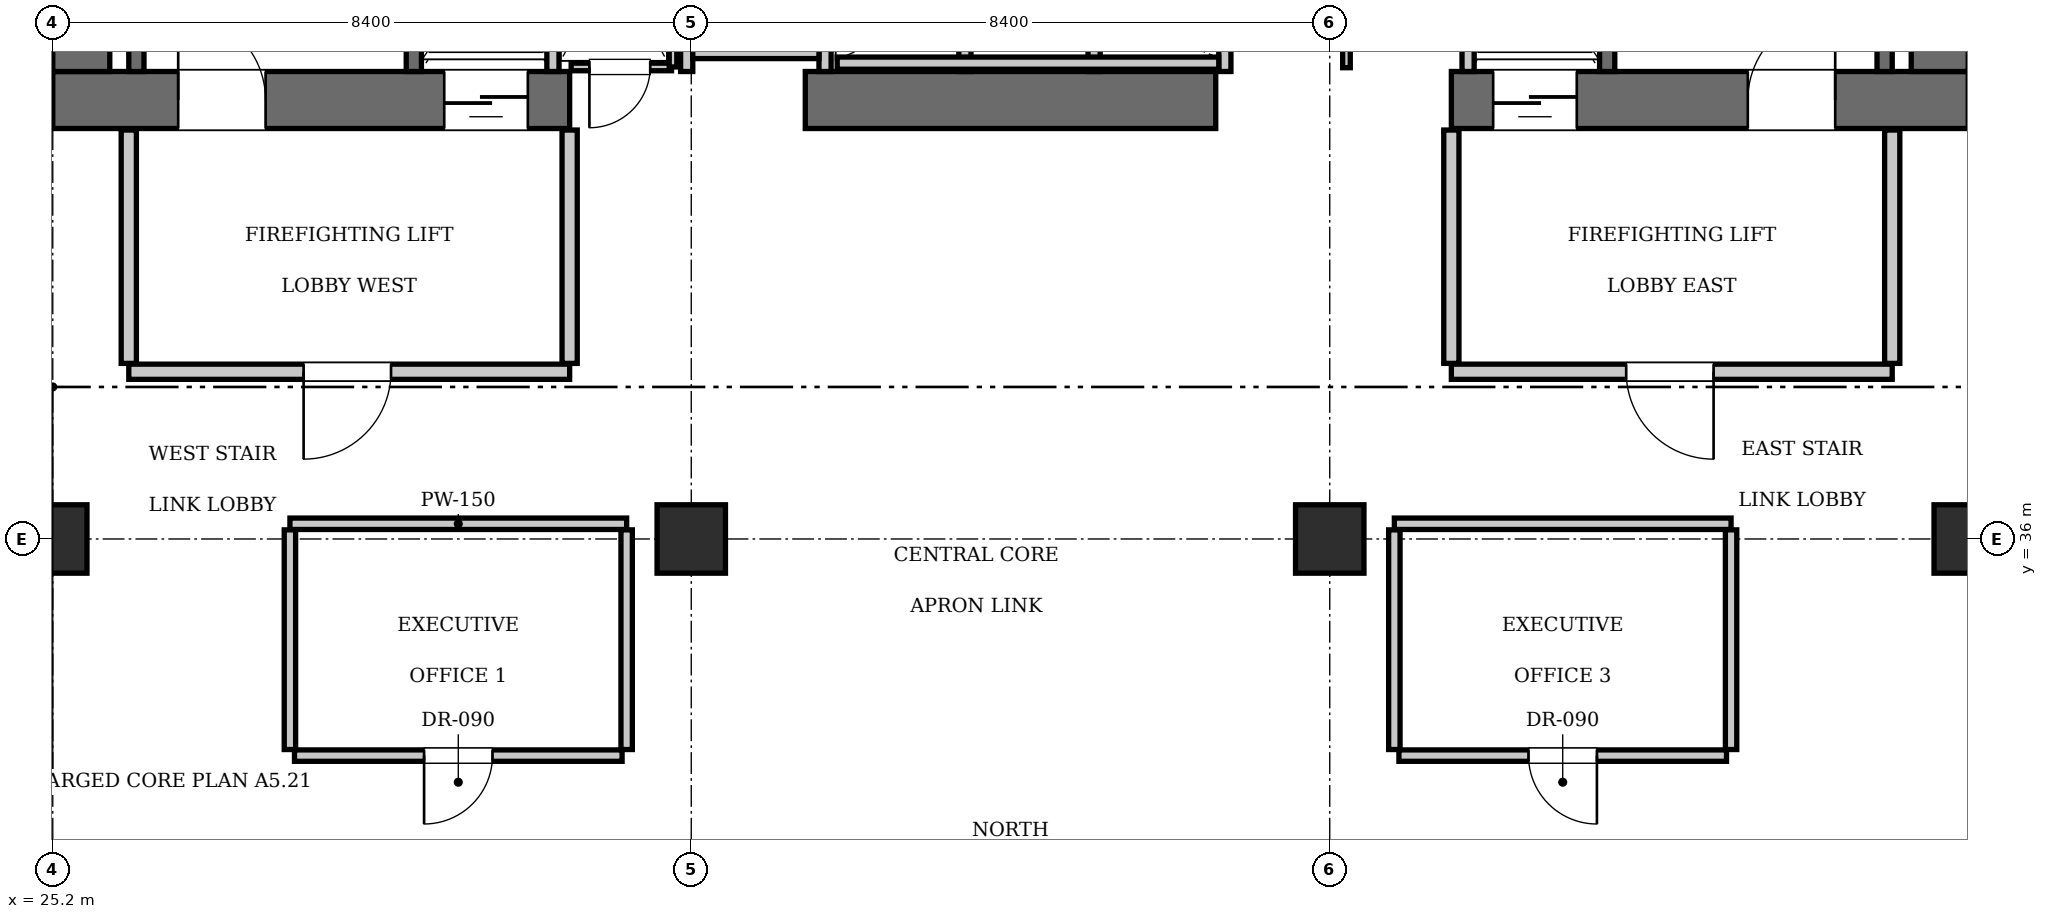
"""IFC4 building model, lengths in metres.
Left out: names, types, materials, properties, quantities, classifications, styles, units other than length and angle.
Written with IfcOpenShell. Run it as: python <this file> out.ifc"""

import sys

from ifc_helpers import new_model, si_unit, direction, frame, frame_2d, origin, origin_2d, place, context, subcontext, project, spatial, rectangle, extrude, element, fill, save


model = new_model("IFC4")
c1 = context("Model", 3, precision=1e-05, world=origin(), true_north=direction((0.0, 1.0)))
c2 = subcontext(c1, "Body", "Model", "MODEL_VIEW")
j1 = project(units=[si_unit("LENGTHUNIT", "METRE"), si_unit("PLANEANGLEUNIT", "RADIAN")], contexts=[c1])
p1 = place(None, origin())
s1 = spatial("IfcSite", under=j1, at=p1, CompositionType="ELEMENT")
p2 = place(p1, origin())
s2 = spatial("IfcBuilding", under=s1, at=p2, CompositionType="ELEMENT")
p3 = place(p2, frame((0.0, 0.0, 200.55)))
s3 = spatial("IfcBuildingStorey", under=s2, at=p3, CompositionType="ELEMENT", Elevation=200.55)
p4 = place(p3, frame((25.2, 41.775, 0.0), z_axis=(0.0, 0.0, 1.0), x_axis=(1.0, 0.0, 0.0)))
e1 = element("IfcWall", 1, at=p4, inside=s3, PredefinedType="SHEAR", context=c2, shape_type="SweptSolid", body=[
    extrude(rectangle(XDim=6.8, YDim=0.75, at=frame_2d((3.4, 0.0))), origin(), (0.0, 0.0, 1.0), 3.85),
])
p5 = place(p4, frame((1.65, 0.0, 0.0)))
e2 = element("IfcOpeningElement", 2, at=p5, cuts=e1, PredefinedType="OPENING", context=c2, shape_type="SweptSolid", body=[
    extrude(rectangle(XDim=1.15, YDim=2.15, at=frame_2d((0.575, 1.075))), frame((0.0, 0.385, 0.0), z_axis=(0.0, -1.0, 0.0), x_axis=(1.0, 0.0, 0.0)), (0.0, 0.0, 1.0), 0.77),
])
p6 = place(p4, frame((5.15, 0.0, 0.0)))
e3 = element("IfcOpeningElement", 3, at=p6, cuts=e1, PredefinedType="OPENING", context=c2, shape_type="SweptSolid", body=[
    extrude(rectangle(XDim=1.1, YDim=2.2, at=frame_2d((0.55, 1.1))), frame((0.0, 0.385, 0.0), z_axis=(0.0, -1.0, 0.0), x_axis=(1.0, 0.0, 0.0)), (0.0, 0.0, 1.0), 0.77),
])
p7 = place(p3, frame((35.1, 41.775, 0.0), z_axis=(0.0, 0.0, 1.0), x_axis=(1.0, 0.0, 0.0)))
e4 = element("IfcWall", 4, at=p7, inside=s3, PredefinedType="SHEAR", context=c2, shape_type="SweptSolid", body=[
    extrude(rectangle(XDim=5.4, YDim=0.75, at=frame_2d((2.7, 0.0))), origin(), (0.0, 0.0, 1.0), 3.85),
])
p8 = place(p3, frame((43.6, 41.775, 0.0), z_axis=(0.0, 0.0, 1.0), x_axis=(1.0, 0.0, 0.0)))
e5 = element("IfcWall", 5, at=p8, inside=s3, PredefinedType="SHEAR", context=c2, shape_type="SweptSolid", body=[
    extrude(rectangle(XDim=6.8, YDim=0.75, at=frame_2d((3.4, 0.0))), origin(), (0.0, 0.0, 1.0), 3.85),
])
p9 = place(p8, frame((3.9, 0.0, 0.0)))
e6 = element("IfcOpeningElement", 6, at=p9, cuts=e5, PredefinedType="OPENING", context=c2, shape_type="SweptSolid", body=[
    extrude(rectangle(XDim=1.15, YDim=2.15, at=frame_2d((0.575, 1.075))), frame((0.0, 0.385, 0.0), z_axis=(0.0, -1.0, 0.0), x_axis=(1.0, 0.0, 0.0)), (0.0, 0.0, 1.0), 0.77),
])
p10 = place(p8, frame((0.55, 0.0, 0.0)))
e7 = element("IfcOpeningElement", 7, at=p10, cuts=e5, PredefinedType="OPENING", context=c2, shape_type="SweptSolid", body=[
    extrude(rectangle(XDim=1.1, YDim=2.2, at=frame_2d((0.55, 1.1))), frame((0.0, 0.385, 0.0), z_axis=(0.0, -1.0, 0.0), x_axis=(1.0, 0.0, 0.0)), (0.0, 0.0, 1.0), 0.77),
])
for number, where, z_axis, x_axis in (
    (8, (25.575, 42.15, 0.0), (0.0, 0.0, 1.0), (0.0, 1.0, 0.0)),
    (9, (50.025, 42.15, 0.0), (0.0, 0.0, 1.0), (0.0, 1.0, 0.0)),
):
    element("IfcWall", number, at=place(p3, frame(where, z_axis=z_axis, x_axis=x_axis)), inside=s3, PredefinedType="SHEAR", context=c2, shape_type="SweptSolid", body=[
        extrude(rectangle(XDim=1.9, YDim=0.75, at=frame_2d((0.95, 0.0))), origin(), (0.0, 0.0, 1.0), 3.85),
    ])
for number, where, z_axis, x_axis in (
    (10, (25.2, 36.0, 0.0), (0.0, 0.0, 1.0), (1.0, 0.0, 0.0)),
    (11, (33.6, 36.0, 0.0), (0.0, 0.0, 1.0), (1.0, 0.0, 0.0)),
    (12, (42.0, 36.0, 0.0), (0.0, 0.0, 1.0), (1.0, 0.0, 0.0)),
    (13, (50.4, 36.0, 0.0), (0.0, 0.0, 1.0), (1.0, 0.0, 0.0)),
):
    element("IfcColumn", number, at=place(p3, frame(where, z_axis=z_axis, x_axis=x_axis)), inside=s3, PredefinedType="COLUMN", context=c2, shape_type="SweptSolid", body=[
        extrude(rectangle(XDim=0.9, YDim=0.9, at=origin_2d()), origin(), (0.0, 0.0, 1.0), 3.85),
    ])
p11 = place(p3, frame((29.95, 42.15, 0.0), z_axis=(0.0, 0.0, 1.0), x_axis=(0.0, 1.0, 0.0)))
e14 = element("IfcWall", 14, at=p11, inside=s3, PredefinedType="SOLIDWALL", context=c2, shape_type="SweptSolid", body=[
    extrude(rectangle(XDim=9.0, YDim=0.2, at=frame_2d((4.5, 0.0))), origin(), (0.0, 0.0, 1.0), 3.61),
])
p12 = place(p3, frame((26.3, 42.15, 0.0), z_axis=(0.0, 0.0, 1.0), x_axis=(0.0, 1.0, 0.0)))
e15 = element("IfcWall", 15, at=p12, inside=s3, PredefinedType="SOLIDWALL", context=c2, shape_type="SweptSolid", body=[
    extrude(rectangle(XDim=1.87, YDim=0.2, at=frame_2d((0.935, 0.0))), origin(), (0.0, 0.0, 1.0), 3.61),
])
p13 = place(p3, frame((45.65, 42.15, 0.0), z_axis=(0.0, 0.0, 1.0), x_axis=(0.0, 1.0, 0.0)))
e16 = element("IfcWall", 16, at=p13, inside=s3, PredefinedType="SOLIDWALL", context=c2, shape_type="SweptSolid", body=[
    extrude(rectangle(XDim=9.0, YDim=0.2, at=frame_2d((4.5, 0.0))), origin(), (0.0, 0.0, 1.0), 3.61),
])
p14 = place(p3, frame((49.3, 42.15, 0.0), z_axis=(0.0, 0.0, 1.0), x_axis=(0.0, 1.0, 0.0)))
e17 = element("IfcWall", 17, at=p14, inside=s3, PredefinedType="SOLIDWALL", context=c2, shape_type="SweptSolid", body=[
    extrude(rectangle(XDim=1.87, YDim=0.2, at=frame_2d((0.935, 0.0))), origin(), (0.0, 0.0, 1.0), 3.61),
])
for number, where, z_axis, x_axis in (
    (18, (31.78, 42.15, 0.0), (0.0, 0.0, 1.0), (0.0, 1.0, 0.0)),
    (19, (43.82, 42.15, 0.0), (0.0, 0.0, 1.0), (0.0, 1.0, 0.0)),
):
    element("IfcWall", number, at=place(p3, frame(where, z_axis=z_axis, x_axis=x_axis)), inside=s3, PredefinedType="SOLIDWALL", context=c2, shape_type="SweptSolid", body=[
        extrude(rectangle(XDim=2.59, YDim=0.16, at=frame_2d((1.295, 0.0))), origin(), (0.0, 0.0, 1.0), 3.61),
    ])
for number, where, z_axis, x_axis in (
    (20, (37.2, 42.15, 0.0), (0.0, 0.0, 1.0), (0.0, 1.0, 0.0)),
    (21, (38.9, 42.15, 0.0), (0.0, 0.0, 1.0), (0.0, 1.0, 0.0)),
    (22, (40.62, 42.15, 0.0), (0.0, 0.0, 1.0), (0.0, 1.0, 0.0)),
):
    element("IfcWall", number, at=place(p3, frame(where, z_axis=z_axis, x_axis=x_axis)), inside=s3, PredefinedType="SOLIDWALL", context=c2, shape_type="SweptSolid", body=[
        extrude(rectangle(XDim=2.2, YDim=0.16, at=frame_2d((1.1, 0.0))), origin(), (0.0, 0.0, 1.0), 3.61),
    ])
p15 = place(p3, frame((35.52, 42.26, 0.0), z_axis=(0.0, 0.0, 1.0), x_axis=(1.0, 0.0, 0.0)))
e23 = element("IfcWall", 23, at=p15, inside=s3, PredefinedType="SOLIDWALL", context=c2, shape_type="SweptSolid", body=[
    extrude(rectangle(XDim=5.02, YDim=0.16, at=frame_2d((2.51, 0.0))), origin(), (0.0, 0.0, 1.0), 3.61),
])
for number, where, z_axis, x_axis in (
    (24, (33.54, 42.15, 0.0), (0.0, 0.0, 1.0), (0.0, 1.0, 0.0)),
    (25, (35.36, 42.15, 0.0), (0.0, 0.0, 1.0), (0.0, 1.0, 0.0)),
):
    element("IfcWall", number, at=place(p3, frame(where, z_axis=z_axis, x_axis=x_axis)), inside=s3, PredefinedType="SOLIDWALL", context=c2, shape_type="SweptSolid", body=[
        extrude(rectangle(XDim=2.25, YDim=0.16, at=frame_2d((1.125, 0.0))), origin(), (0.0, 0.0, 1.0), 3.61),
    ])
p16 = place(p3, frame((33.62, 42.4, 0.0), z_axis=(0.0, 0.0, 1.0), x_axis=(1.0, 0.0, 0.0)))
e26 = element("IfcWall", 26, at=p16, inside=s3, PredefinedType="SOLIDWALL", context=c2, shape_type="SweptSolid", body=[
    extrude(rectangle(XDim=1.66, YDim=0.16, at=frame_2d((0.83, 0.0))), origin(), (0.0, 0.0, 1.0), 3.61),
])
p17 = place(p3, frame((26.2, 38.2, 0.0), z_axis=(0.0, 0.0, 1.0), x_axis=(1.0, 0.0, 0.0)))
e27 = element("IfcWall", 27, at=p17, inside=s3, PredefinedType="PARTITIONING", context=c2, shape_type="SweptSolid", body=[
    extrude(rectangle(XDim=5.8, YDim=0.2, at=frame_2d((2.9, 0.0))), origin(), (0.0, 0.0, 1.0), 3.61),
])
p18 = place(p17, frame((2.3, 0.0, 0.0)))
e28 = element("IfcOpeningElement", 28, at=p18, cuts=e27, PredefinedType="OPENING", context=c2, shape_type="SweptSolid", body=[
    extrude(rectangle(XDim=1.15, YDim=2.15, at=frame_2d((0.575, 1.075))), frame((0.0, 0.11, 0.0), z_axis=(0.0, -1.0, 0.0), x_axis=(1.0, 0.0, 0.0)), (0.0, 0.0, 1.0), 0.22),
])
for number, where, z_axis, x_axis in (
    (29, (26.2, 38.31, 0.0), (0.0, 0.0, 1.0), (0.0, 1.0, 0.0)),
    (30, (32.0, 38.31, 0.0), (0.0, 0.0, 1.0), (0.0, 1.0, 0.0)),
):
    element("IfcWall", number, at=place(p3, frame(where, z_axis=z_axis, x_axis=x_axis)), inside=s3, PredefinedType="PARTITIONING", context=c2, shape_type="SweptSolid", body=[
        extrude(rectangle(XDim=3.07, YDim=0.2, at=frame_2d((1.535, 0.0))), origin(), (0.0, 0.0, 1.0), 3.61),
    ])
p19 = place(p3, frame((43.6, 38.2, 0.0), z_axis=(0.0, 0.0, 1.0), x_axis=(1.0, 0.0, 0.0)))
e31 = element("IfcWall", 31, at=p19, inside=s3, PredefinedType="PARTITIONING", context=c2, shape_type="SweptSolid", body=[
    extrude(rectangle(XDim=5.8, YDim=0.2, at=frame_2d((2.9, 0.0))), origin(), (0.0, 0.0, 1.0), 3.61),
])
p20 = place(p19, frame((2.3, 0.0, 0.0)))
e32 = element("IfcOpeningElement", 32, at=p20, cuts=e31, PredefinedType="OPENING", context=c2, shape_type="SweptSolid", body=[
    extrude(rectangle(XDim=1.15, YDim=2.15, at=frame_2d((0.575, 1.075))), frame((0.0, 0.11, 0.0), z_axis=(0.0, -1.0, 0.0), x_axis=(1.0, 0.0, 0.0)), (0.0, 0.0, 1.0), 0.22),
])
for number, where, z_axis, x_axis in (
    (33, (43.6, 38.31, 0.0), (0.0, 0.0, 1.0), (0.0, 1.0, 0.0)),
    (34, (49.4, 38.31, 0.0), (0.0, 0.0, 1.0), (0.0, 1.0, 0.0)),
):
    element("IfcWall", number, at=place(p3, frame(where, z_axis=z_axis, x_axis=x_axis)), inside=s3, PredefinedType="PARTITIONING", context=c2, shape_type="SweptSolid", body=[
        extrude(rectangle(XDim=3.07, YDim=0.2, at=frame_2d((1.535, 0.0))), origin(), (0.0, 0.0, 1.0), 3.61),
    ])
p21 = place(p3, frame((32.02, 42.21, 0.0), z_axis=(0.0, 0.0, 1.0), x_axis=(1.0, 0.0, 0.0)))
e35 = element("IfcWall", 35, at=p21, inside=s3, PredefinedType="PARTITIONING", context=c2, shape_type="SweptSolid", body=[
    extrude(rectangle(XDim=1.32, YDim=0.1, at=frame_2d((0.66, 0.0))), origin(), (0.0, 0.0, 1.0), 3.61),
])
p22 = place(p21, frame((0.24, 0.0, 0.0)))
e36 = element("IfcOpeningElement", 36, at=p22, cuts=e35, PredefinedType="OPENING", context=c2, shape_type="SweptSolid", body=[
    extrude(rectangle(XDim=0.8, YDim=2.05, at=frame_2d((0.4, 1.025))), frame((0.0, 0.06, 0.0), z_axis=(0.0, -1.0, 0.0), x_axis=(1.0, 0.0, 0.0)), (0.0, 0.0, 1.0), 0.12),
])
p23 = place(p3, frame((33.36, 42.21, 0.0), z_axis=(0.0, 0.0, 1.0), x_axis=(0.0, 1.0, 0.0)))
e37 = element("IfcWall", 37, at=p23, inside=s3, PredefinedType="PARTITIONING", context=c2, shape_type="SweptSolid", body=[
    extrude(rectangle(XDim=2.73, YDim=0.1, at=frame_2d((1.365, 0.0))), origin(), (0.0, 0.0, 1.0), 3.61),
])
p24 = place(p3, frame((42.22, 42.2, 0.0), z_axis=(0.0, 0.0, 1.0), x_axis=(0.0, 1.0, 0.0)))
e38 = element("IfcWall", 38, at=p24, inside=s3, PredefinedType="PARTITIONING", context=c2, shape_type="SweptSolid", body=[
    extrude(rectangle(XDim=2.76, YDim=0.1, at=frame_2d((1.38, 0.0))), origin(), (0.0, 0.0, 1.0), 3.61),
])
p25 = place(p24, frame((0.65, 0.0, 0.0)))
e39 = element("IfcOpeningElement", 39, at=p25, cuts=e38, PredefinedType="OPENING", context=c2, shape_type="SweptSolid", body=[
    extrude(rectangle(XDim=0.8, YDim=2.05, at=frame_2d((0.4, 1.025))), frame((0.0, 0.06, 0.0), z_axis=(0.0, -1.0, 0.0), x_axis=(1.0, 0.0, 0.0)), (0.0, 0.0, 1.0), 0.12),
])
p26 = place(p3, frame((28.32, 36.2, 0.0), z_axis=(0.0, 0.0, 1.0), x_axis=(1.0, 0.0, 0.0)))
e40 = element("IfcWall", 40, at=p26, inside=s3, PredefinedType="PARTITIONING", context=c2, shape_type="SweptSolid", body=[
    extrude(rectangle(XDim=4.43, YDim=0.15, at=frame_2d((2.215, 0.0))), origin(), (0.0, 0.0, 1.0), 3.61),
])
for number, where, z_axis, x_axis in (
    (41, (28.32, 33.23, 0.0), (0.0, 0.0, 1.0), (0.0, 1.0, 0.0)),
    (42, (32.75, 33.23, 0.0), (0.0, 0.0, 1.0), (0.0, 1.0, 0.0)),
):
    element("IfcWall", number, at=place(p3, frame(where, z_axis=z_axis, x_axis=x_axis)), inside=s3, PredefinedType="PARTITIONING", context=c2, shape_type="SweptSolid", body=[
        extrude(rectangle(XDim=2.89, YDim=0.15, at=frame_2d((1.445, 0.0))), origin(), (0.0, 0.0, 1.0), 3.61),
    ])
p27 = place(p3, frame((28.38, 33.15, 0.0), z_axis=(0.0, 0.0, 1.0), x_axis=(1.0, 0.0, 0.0)))
e43 = element("IfcWall", 43, at=p27, inside=s3, PredefinedType="PARTITIONING", context=c2, shape_type="SweptSolid", body=[
    extrude(rectangle(XDim=4.31, YDim=0.15, at=frame_2d((2.155, 0.0))), origin(), (0.0, 0.0, 1.0), 3.61),
])
p28 = place(p27, frame((1.705, 0.0, 0.0)))
e44 = element("IfcOpeningElement", 44, at=p28, cuts=e43, PredefinedType="OPENING", context=c2, shape_type="SweptSolid", body=[
    extrude(rectangle(XDim=0.9, YDim=2.1, at=frame_2d((0.45, 1.05))), frame((0.0, 0.085, 0.0), z_axis=(0.0, -1.0, 0.0), x_axis=(1.0, 0.0, 0.0)), (0.0, 0.0, 1.0), 0.17),
])
p29 = place(p3, frame((42.85, 36.2, 0.0), z_axis=(0.0, 0.0, 1.0), x_axis=(1.0, 0.0, 0.0)))
e45 = element("IfcWall", 45, at=p29, inside=s3, PredefinedType="PARTITIONING", context=c2, shape_type="SweptSolid", body=[
    extrude(rectangle(XDim=4.43, YDim=0.15, at=frame_2d((2.215, 0.0))), origin(), (0.0, 0.0, 1.0), 3.61),
])
for number, where, z_axis, x_axis in (
    (46, (42.85, 33.23, 0.0), (0.0, 0.0, 1.0), (0.0, 1.0, 0.0)),
    (47, (47.28, 33.23, 0.0), (0.0, 0.0, 1.0), (0.0, 1.0, 0.0)),
):
    element("IfcWall", number, at=place(p3, frame(where, z_axis=z_axis, x_axis=x_axis)), inside=s3, PredefinedType="PARTITIONING", context=c2, shape_type="SweptSolid", body=[
        extrude(rectangle(XDim=2.89, YDim=0.15, at=frame_2d((1.445, 0.0))), origin(), (0.0, 0.0, 1.0), 3.61),
    ])
p30 = place(p3, frame((42.91, 33.15, 0.0), z_axis=(0.0, 0.0, 1.0), x_axis=(1.0, 0.0, 0.0)))
e48 = element("IfcWall", 48, at=p30, inside=s3, PredefinedType="PARTITIONING", context=c2, shape_type="SweptSolid", body=[
    extrude(rectangle(XDim=4.31, YDim=0.15, at=frame_2d((2.155, 0.0))), origin(), (0.0, 0.0, 1.0), 3.61),
])
p31 = place(p30, frame((1.705, 0.0, 0.0)))
e49 = element("IfcOpeningElement", 49, at=p31, cuts=e48, PredefinedType="OPENING", context=c2, shape_type="SweptSolid", body=[
    extrude(rectangle(XDim=0.9, YDim=2.1, at=frame_2d((0.45, 1.05))), frame((0.0, 0.085, 0.0), z_axis=(0.0, -1.0, 0.0), x_axis=(1.0, 0.0, 0.0)), (0.0, 0.0, 1.0), 0.17),
])
p32 = place(p5, origin())
e50 = element("IfcDoor", 50, at=p32, inside=s3, OperationType="SINGLE_SWING_LEFT", PredefinedType="DOOR", context=c2, shape_type="SweptSolid", body=[
    extrude(rectangle(XDim=1.15, YDim=2.15, at=frame_2d((0.575, 1.075))), frame((0.0, 0.025, 0.0), z_axis=(0.0, -1.0, 0.0), x_axis=(1.0, 0.0, 0.0)), (0.0, 0.0, 1.0), 0.05),
])
fill(e2, e50)
p33 = place(p9, origin())
e51 = element("IfcDoor", 51, at=p33, inside=s3, OperationType="SINGLE_SWING_RIGHT", PredefinedType="DOOR", context=c2, shape_type="SweptSolid", body=[
    extrude(rectangle(XDim=1.15, YDim=2.15, at=frame_2d((0.575, 1.075))), frame((0.0, 0.025, 0.0), z_axis=(0.0, -1.0, 0.0), x_axis=(1.0, 0.0, 0.0)), (0.0, 0.0, 1.0), 0.05),
])
fill(e6, e51)
p34 = place(p6, frame((1.1, 0.0, 0.0), z_axis=(0.0, 0.0, 1.0), x_axis=(-1.0, 0.0, 0.0)))
e52 = element("IfcDoor", 52, at=p34, inside=s3, OperationType="SLIDING_TO_LEFT", PredefinedType="DOOR", context=c2, shape_type="SweptSolid", body=[
    extrude(rectangle(XDim=1.1, YDim=2.2, at=frame_2d((0.55, 1.1))), frame((0.0, 0.025, 0.0), z_axis=(0.0, -1.0, 0.0), x_axis=(1.0, 0.0, 0.0)), (0.0, 0.0, 1.0), 0.05),
])
fill(e3, e52)
p35 = place(p10, frame((1.1, 0.0, 0.0), z_axis=(0.0, 0.0, 1.0), x_axis=(-1.0, 0.0, 0.0)))
e53 = element("IfcDoor", 53, at=p35, inside=s3, OperationType="SLIDING_TO_LEFT", PredefinedType="DOOR", context=c2, shape_type="SweptSolid", body=[
    extrude(rectangle(XDim=1.1, YDim=2.2, at=frame_2d((0.55, 1.1))), frame((0.0, 0.025, 0.0), z_axis=(0.0, -1.0, 0.0), x_axis=(1.0, 0.0, 0.0)), (0.0, 0.0, 1.0), 0.05),
])
fill(e7, e53)
p36 = place(p18, frame((1.15, 0.0, 0.0), z_axis=(0.0, 0.0, 1.0), x_axis=(-1.0, 0.0, 0.0)))
e54 = element("IfcDoor", 54, at=p36, inside=s3, OperationType="SINGLE_SWING_RIGHT", PredefinedType="DOOR", context=c2, shape_type="SweptSolid", body=[
    extrude(rectangle(XDim=1.15, YDim=2.15, at=frame_2d((0.575, 1.075))), frame((0.0, 0.025, 0.0), z_axis=(0.0, -1.0, 0.0), x_axis=(1.0, 0.0, 0.0)), (0.0, 0.0, 1.0), 0.05),
])
fill(e28, e54)
p37 = place(p20, frame((1.15, 0.0, 0.0), z_axis=(0.0, 0.0, 1.0), x_axis=(-1.0, 0.0, 0.0)))
e55 = element("IfcDoor", 55, at=p37, inside=s3, OperationType="SINGLE_SWING_LEFT", PredefinedType="DOOR", context=c2, shape_type="SweptSolid", body=[
    extrude(rectangle(XDim=1.15, YDim=2.15, at=frame_2d((0.575, 1.075))), frame((0.0, 0.025, 0.0), z_axis=(0.0, -1.0, 0.0), x_axis=(1.0, 0.0, 0.0)), (0.0, 0.0, 1.0), 0.05),
])
fill(e32, e55)
p38 = place(p22, frame((0.8, 0.0, 0.0), z_axis=(0.0, 0.0, 1.0), x_axis=(-1.0, 0.0, 0.0)))
e56 = element("IfcDoor", 56, at=p38, inside=s3, OperationType="SINGLE_SWING_RIGHT", PredefinedType="DOOR", context=c2, shape_type="SweptSolid", body=[
    extrude(rectangle(XDim=0.8, YDim=2.05, at=frame_2d((0.4, 1.025))), frame((0.0, 0.025, 0.0), z_axis=(0.0, -1.0, 0.0), x_axis=(1.0, 0.0, 0.0)), (0.0, 0.0, 1.0), 0.05),
])
fill(e36, e56)
p39 = place(p28, frame((0.9, 0.0, 0.0), z_axis=(0.0, 0.0, 1.0), x_axis=(-1.0, 0.0, 0.0)))
e57 = element("IfcDoor", 57, at=p39, inside=s3, OperationType="SINGLE_SWING_RIGHT", PredefinedType="DOOR", context=c2, shape_type="SweptSolid", body=[
    extrude(rectangle(XDim=0.9, YDim=2.1, at=frame_2d((0.45, 1.05))), frame((0.0, 0.025, 0.0), z_axis=(0.0, -1.0, 0.0), x_axis=(1.0, 0.0, 0.0)), (0.0, 0.0, 1.0), 0.05),
])
fill(e44, e57)
p40 = place(p31, frame((0.9, 0.0, 0.0), z_axis=(0.0, 0.0, 1.0), x_axis=(-1.0, 0.0, 0.0)))
e58 = element("IfcDoor", 58, at=p40, inside=s3, OperationType="SINGLE_SWING_LEFT", PredefinedType="DOOR", context=c2, shape_type="SweptSolid", body=[
    extrude(rectangle(XDim=0.9, YDim=2.1, at=frame_2d((0.45, 1.05))), frame((0.0, 0.025, 0.0), z_axis=(0.0, -1.0, 0.0), x_axis=(1.0, 0.0, 0.0)), (0.0, 0.0, 1.0), 0.05),
])
fill(e49, e58)
save(model, sys.argv[1])
